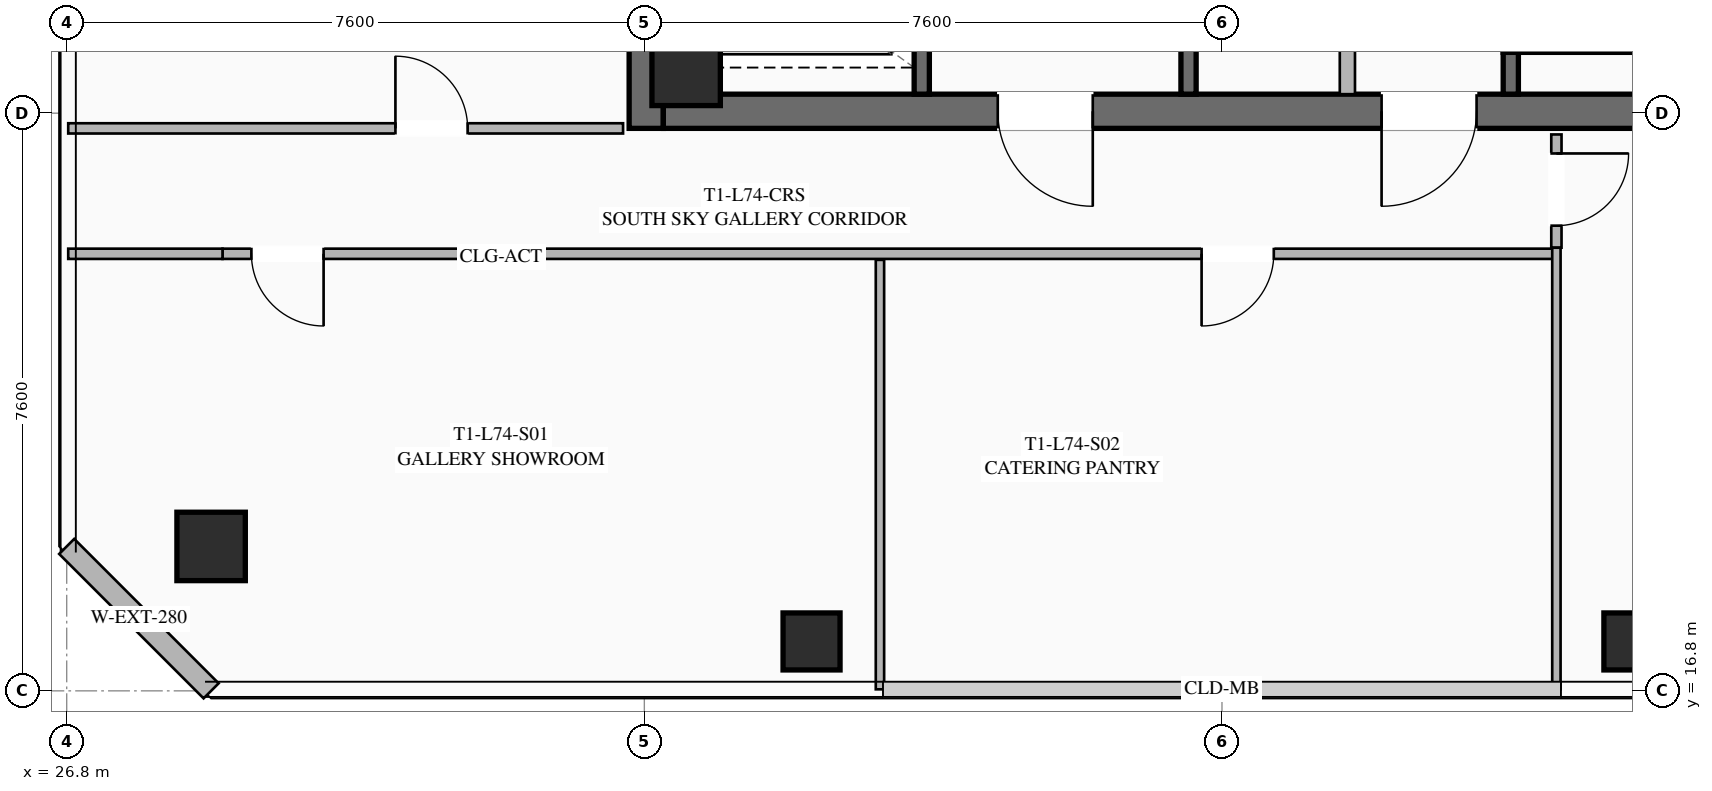
"""IFC4 building model, lengths in metres.
Left out: names, types, materials, properties, quantities, classifications, styles, units other than length and angle.
Written with IfcOpenShell. Run it as: python <this file> out.ifc"""

import sys

from ifc_helpers import new_model, si_unit, direction, frame, frame_2d, origin, origin_2d, place, context, subcontext, project, spatial, rectangle, hollow_rectangle, extrude, element, fill, save


model = new_model("IFC4")
c1 = context("Model", 3, precision=1e-05, world=origin(), true_north=direction((0.0, 1.0)))
c2 = subcontext(c1, "Body", "Model", "MODEL_VIEW")
j1 = project(units=[si_unit("LENGTHUNIT", "METRE"), si_unit("PLANEANGLEUNIT", "RADIAN")], contexts=[c1])
p1 = place(None, origin())
s1 = spatial("IfcSite", under=j1, at=p1, CompositionType="ELEMENT")
p2 = place(p1, origin())
s2 = spatial("IfcBuilding", under=s1, at=p2, CompositionType="ELEMENT")
p3 = place(p2, frame((0.0, 0.0, 274.05)))
s3 = spatial("IfcBuildingStorey", under=s2, at=p3, CompositionType="ELEMENT", Elevation=274.05)
p4 = place(p3, frame((34.425, 24.2, 0.0), z_axis=(0.0, 0.0, 1.0), x_axis=(0.0, 1.0, 0.0)))
e1 = element("IfcWall", 1, at=p4, inside=s3, PredefinedType="SHEAR", context=c2, shape_type="SweptSolid", body=[
    extrude(rectangle(XDim=15.6, YDim=0.45, at=frame_2d((7.8, 0.0))), origin(), (0.0, 0.0, 1.0), 3.55),
])
p5 = place(p3, frame((49.35, 24.425, 0.0), z_axis=(0.0, 0.0, 1.0), x_axis=(-1.0, 0.0, 0.0)))
e2 = element("IfcWall", 2, at=p5, inside=s3, PredefinedType="SHEAR", context=c2, shape_type="SweptSolid", body=[
    extrude(rectangle(XDim=14.7, YDim=0.45, at=frame_2d((7.35, 0.0))), origin(), (0.0, 0.0, 1.0), 3.55),
])
p6 = place(p5, frame((9.05, 0.0, 0.0)))
e3 = element("IfcOpeningElement", 3, at=p6, cuts=e2, PredefinedType="OPENING", context=c2, shape_type="SweptSolid", body=[
    extrude(rectangle(XDim=1.25, YDim=2.25, at=frame_2d((0.625, 1.125))), frame((0.0, 0.235, 0.0), z_axis=(0.0, -1.0, 0.0), x_axis=(1.0, 0.0, 0.0)), (0.0, 0.0, 1.0), 0.47),
])
p7 = place(p5, frame((4.0, 0.0, 0.0)))
e4 = element("IfcOpeningElement", 4, at=p7, cuts=e2, PredefinedType="OPENING", context=c2, shape_type="SweptSolid", body=[
    extrude(rectangle(XDim=1.25, YDim=2.25, at=frame_2d((0.625, 1.125))), frame((0.0, 0.235, 0.0), z_axis=(0.0, -1.0, 0.0), x_axis=(1.0, 0.0, 0.0)), (0.0, 0.0, 1.0), 0.47),
])
for number, where, z_axis, x_axis in (
    (5, (34.95, 24.95, 0.0), (0.0, 0.0, 1.0), (1.0, 0.0, 0.0)),
    (6, (28.7, 18.7, 0.0), (0.0, 0.0, 1.0), (1.0, 0.0, 0.0)),
):
    element("IfcColumn", number, at=place(p3, frame(where, z_axis=z_axis, x_axis=x_axis)), inside=s3, PredefinedType="COLUMN", context=c2, shape_type="SweptSolid", body=[
        extrude(hollow_rectangle(XDim=0.9, YDim=0.9, WallThickness=0.04, at=origin_2d()), origin(), (0.0, 0.0, 1.0), 3.25),
    ])
for number, where, z_axis, x_axis in (
    (7, (36.6, 17.45, 0.0), (0.0, 0.0, 1.0), (1.0, 0.0, 0.0)),
    (8, (47.4, 17.45, 0.0), (0.0, 0.0, 1.0), (1.0, 0.0, 0.0)),
):
    element("IfcColumn", number, at=place(p3, frame(where, z_axis=z_axis, x_axis=x_axis)), inside=s3, PredefinedType="COLUMN", context=c2, shape_type="SweptSolid", body=[
        extrude(hollow_rectangle(XDim=0.75, YDim=0.75, WallThickness=0.032, at=origin_2d()), origin(), (0.0, 0.0, 1.0), 3.25),
    ])
p8 = place(p3, frame((28.7, 16.8, 0.0), z_axis=(0.0, 0.0, 1.0), x_axis=(-0.707106781187, 0.707106781187, 0.0)))
e9 = element("IfcWall", 9, at=p8, inside=s3, PredefinedType="SOLIDWALL", context=c2, shape_type="SweptSolid", body=[
    extrude(rectangle(XDim=2.687, YDim=0.28, at=frame_2d((1.343, 0.0))), origin(), (0.0, 0.0, 1.0), 3.25),
])
p9 = place(p3, frame((45.8, 32.8, 0.0), z_axis=(0.0, 0.0, 1.0), x_axis=(0.0, -1.0, 0.0)))
e10 = element("IfcWall", 10, at=p9, inside=s3, PredefinedType="SHEAR", context=c2, shape_type="SweptSolid", body=[
    extrude(rectangle(XDim=8.15, YDim=0.2, at=frame_2d((4.075, 0.0))), origin(), (0.0, 0.0, 1.0), 3.25),
])
p10 = place(p9, frame((0.45, 0.0, 0.0)))
e11 = element("IfcOpeningElement", 11, at=p10, cuts=e10, PredefinedType="OPENING", context=c2, shape_type="SweptSolid", body=[
    extrude(rectangle(XDim=1.15, YDim=2.2, at=frame_2d((0.575, 1.1))), frame((0.0, 0.11, 0.0), z_axis=(0.0, -1.0, 0.0), x_axis=(1.0, 0.0, 0.0)), (0.0, 0.0, 1.0), 0.22),
])
p11 = place(p3, frame((41.56, 24.65, 0.0), z_axis=(0.0, 0.0, 1.0), x_axis=(0.0, 1.0, 0.0)))
e12 = element("IfcWall", 12, at=p11, inside=s3, PredefinedType="SHEAR", context=c2, shape_type="SweptSolid", body=[
    extrude(rectangle(XDim=14.7, YDim=0.2, at=frame_2d((7.35, 0.0))), origin(), (0.0, 0.0, 1.0), 3.25),
])
p12 = place(p3, frame((38.05, 24.65, 0.0), z_axis=(0.0, 0.0, 1.0), x_axis=(0.0, 1.0, 0.0)))
e13 = element("IfcWall", 13, at=p12, inside=s3, PredefinedType="SHEAR", context=c2, shape_type="SweptSolid", body=[
    extrude(rectangle(XDim=6.55, YDim=0.2, at=frame_2d((3.275, 0.0))), origin(), (0.0, 0.0, 1.0), 3.25),
])
p13 = place(p12, frame((4.975, 0.0, 0.0)))
e14 = element("IfcOpeningElement", 14, at=p13, cuts=e13, PredefinedType="OPENING", context=c2, shape_type="SweptSolid", body=[
    extrude(rectangle(XDim=1.3, YDim=2.25, at=frame_2d((0.65, 1.125))), frame((0.0, 0.11, 0.0), z_axis=(0.0, -1.0, 0.0), x_axis=(1.0, 0.0, 0.0)), (0.0, 0.0, 1.0), 0.22),
])
p14 = place(p12, frame((2.975, 0.0, 0.0)))
e15 = element("IfcOpeningElement", 15, at=p14, cuts=e13, PredefinedType="OPENING", context=c2, shape_type="SweptSolid", body=[
    extrude(rectangle(XDim=1.3, YDim=2.25, at=frame_2d((0.65, 1.125))), frame((0.0, 0.11, 0.0), z_axis=(0.0, -1.0, 0.0), x_axis=(1.0, 0.0, 0.0)), (0.0, 0.0, 1.0), 0.22),
])
p15 = place(p12, frame((0.775, 0.0, 0.0)))
e16 = element("IfcOpeningElement", 16, at=p15, cuts=e13, PredefinedType="OPENING", context=c2, shape_type="SweptSolid", body=[
    extrude(rectangle(XDim=1.3, YDim=2.25, at=frame_2d((0.65, 1.125))), frame((0.0, 0.11, 0.0), z_axis=(0.0, -1.0, 0.0), x_axis=(1.0, 0.0, 0.0)), (0.0, 0.0, 1.0), 0.22),
])
p16 = place(p3, frame((43.65, 24.65, 0.0), z_axis=(0.0, 0.0, 1.0), x_axis=(0.0, 1.0, 0.0)))
e17 = element("IfcWall", 17, at=p16, inside=s3, PredefinedType="SOLIDWALL", context=c2, shape_type="SweptSolid", body=[
    extrude(rectangle(XDim=7.0, YDim=0.2, at=frame_2d((3.5, 0.0))), origin(), (0.0, 0.0, 1.0), 2.603),
])
p17 = place(p16, frame((0.85, 0.0, 0.0)))
e18 = element("IfcOpeningElement", 18, at=p17, cuts=e17, PredefinedType="OPENING", context=c2, shape_type="SweptSolid", body=[
    extrude(rectangle(XDim=0.95, YDim=2.05, at=frame_2d((0.475, 1.025))), frame((0.0, 0.11, 0.0), z_axis=(0.0, -1.0, 0.0), x_axis=(1.0, 0.0, 0.0)), (0.0, 0.0, 1.0), 0.22),
])
p18 = place(p16, frame((4.8, 0.0, 0.0)))
e19 = element("IfcOpeningElement", 19, at=p18, cuts=e17, PredefinedType="OPENING", context=c2, shape_type="SweptSolid", body=[
    extrude(rectangle(XDim=1.05, YDim=2.2, at=frame_2d((0.525, 1.1))), frame((0.0, 0.11, 0.0), z_axis=(0.0, -1.0, 0.0), x_axis=(1.0, 0.0, 0.0)), (0.0, 0.0, 1.0), 0.22),
])
p19 = place(p3, frame((46.4, 22.55, 0.0), z_axis=(0.0, 0.0, 1.0), x_axis=(-1.0, 0.0, 0.0)))
e20 = element("IfcWall", 20, at=p19, inside=s3, PredefinedType="PARTITIONING", context=c2, shape_type="SweptSolid", body=[
    extrude(rectangle(XDim=17.55, YDim=0.135, at=frame_2d((8.775, 0.0))), origin(), (0.0, 0.0, 1.0), 2.603),
])
p20 = place(p19, frame((16.22, 0.0, 0.0)))
e21 = element("IfcOpeningElement", 21, at=p20, cuts=e20, PredefinedType="OPENING", context=c2, shape_type="SweptSolid", body=[
    extrude(rectangle(XDim=0.95, YDim=2.05, at=frame_2d((0.475, 1.025))), frame((0.0, 0.077, 0.0), z_axis=(0.0, -1.0, 0.0), x_axis=(1.0, 0.0, 0.0)), (0.0, 0.0, 1.0), 0.155),
])
p21 = place(p19, frame((3.718, 0.0, 0.0)))
e22 = element("IfcOpeningElement", 22, at=p21, cuts=e20, PredefinedType="OPENING", context=c2, shape_type="SweptSolid", body=[
    extrude(rectangle(XDim=0.95, YDim=2.05, at=frame_2d((0.475, 1.025))), frame((0.0, 0.077, 0.0), z_axis=(0.0, -1.0, 0.0), x_axis=(1.0, 0.0, 0.0)), (0.0, 0.0, 1.0), 0.155),
])
p22 = place(p3, frame((26.82, 22.55, 0.0), z_axis=(0.0, 0.0, 1.0), x_axis=(1.0, 0.0, 0.0)))
e23 = element("IfcWall", 23, at=p22, inside=s3, PredefinedType="PARTITIONING", context=c2, shape_type="SweptSolid", body=[
    extrude(rectangle(XDim=2.03, YDim=0.135, at=frame_2d((1.015, 0.0))), origin(), (0.0, 0.0, 1.0), 2.603),
])
p23 = place(p3, frame((46.4, 24.12, 0.0), z_axis=(0.0, 0.0, 1.0), x_axis=(0.0, -1.0, 0.0)))
e24 = element("IfcWall", 24, at=p23, inside=s3, PredefinedType="PARTITIONING", context=c2, shape_type="SweptSolid", body=[
    extrude(rectangle(XDim=1.49, YDim=0.135, at=frame_2d((0.745, 0.0))), origin(), (0.0, 0.0, 1.0), 2.603),
])
p24 = place(p23, frame((0.25, 0.0, 0.0)))
e25 = element("IfcOpeningElement", 25, at=p24, cuts=e24, PredefinedType="OPENING", context=c2, shape_type="SweptSolid", body=[
    extrude(rectangle(XDim=0.95, YDim=2.05, at=frame_2d((0.475, 1.025))), frame((0.0, 0.077, 0.0), z_axis=(0.0, -1.0, 0.0), x_axis=(1.0, 0.0, 0.0)), (0.0, 0.0, 1.0), 0.155),
])
p25 = place(p3, frame((37.5, 16.82, 0.0), z_axis=(0.0, 0.0, 1.0), x_axis=(0.0, 1.0, 0.0)))
e26 = element("IfcWall", 26, at=p25, inside=s3, PredefinedType="PARTITIONING", context=c2, shape_type="SweptSolid", body=[
    extrude(rectangle(XDim=5.65, YDim=0.11, at=frame_2d((2.825, 0.0))), origin(), (0.0, 0.0, 1.0), 2.603),
])
p26 = place(p3, frame((46.4, 16.82, 0.0), z_axis=(0.0, 0.0, 1.0), x_axis=(0.0, 1.0, 0.0)))
e27 = element("IfcWall", 27, at=p26, inside=s3, PredefinedType="PARTITIONING", context=c2, shape_type="SweptSolid", body=[
    extrude(rectangle(XDim=5.81, YDim=0.11, at=frame_2d((2.905, 0.0))), origin(), (0.0, 0.0, 1.0), 2.603),
])
p27 = place(p3, frame((26.82, 24.2, 0.0), z_axis=(0.0, 0.0, 1.0), x_axis=(1.0, 0.0, 0.0)))
e28 = element("IfcWall", 28, at=p27, inside=s3, PredefinedType="PARTITIONING", context=c2, shape_type="SweptSolid", body=[
    extrude(rectangle(XDim=7.3, YDim=0.135, at=frame_2d((3.65, 0.0))), origin(), (0.0, 0.0, 1.0), 2.603),
])
p28 = place(p27, frame((4.305, 0.0, 0.0)))
e29 = element("IfcOpeningElement", 29, at=p28, cuts=e28, PredefinedType="OPENING", context=c2, shape_type="SweptSolid", body=[
    extrude(rectangle(XDim=0.95, YDim=2.05, at=frame_2d((0.475, 1.025))), frame((0.0, 0.077, 0.0), z_axis=(0.0, -1.0, 0.0), x_axis=(1.0, 0.0, 0.0)), (0.0, 0.0, 1.0), 0.155),
])
p29 = place(p6, origin())
e30 = element("IfcDoor", 30, at=p29, inside=s3, OperationType="SINGLE_SWING_LEFT", PredefinedType="DOOR", context=c2, shape_type="SweptSolid", body=[
    extrude(rectangle(XDim=1.25, YDim=2.25, at=frame_2d((0.625, 1.125))), frame((0.0, 0.025, 0.0), z_axis=(0.0, -1.0, 0.0), x_axis=(1.0, 0.0, 0.0)), (0.0, 0.0, 1.0), 0.05),
])
fill(e3, e30)
p30 = place(p7, origin())
e31 = element("IfcDoor", 31, at=p30, inside=s3, OperationType="SINGLE_SWING_RIGHT", PredefinedType="DOOR", context=c2, shape_type="SweptSolid", body=[
    extrude(rectangle(XDim=1.25, YDim=2.25, at=frame_2d((0.625, 1.125))), frame((0.0, 0.025, 0.0), z_axis=(0.0, -1.0, 0.0), x_axis=(1.0, 0.0, 0.0)), (0.0, 0.0, 1.0), 0.05),
])
fill(e4, e31)
p31 = place(p20, origin())
e32 = element("IfcDoor", 32, at=p31, inside=s3, OperationType="SINGLE_SWING_LEFT", PredefinedType="DOOR", context=c2, shape_type="SweptSolid", body=[
    extrude(rectangle(XDim=0.95, YDim=2.05, at=frame_2d((0.475, 1.025))), frame((0.0, 0.025, 0.0), z_axis=(0.0, -1.0, 0.0), x_axis=(1.0, 0.0, 0.0)), (0.0, 0.0, 1.0), 0.05),
])
fill(e21, e32)
p32 = place(p21, origin())
e33 = element("IfcDoor", 33, at=p32, inside=s3, OperationType="SINGLE_SWING_RIGHT", PredefinedType="DOOR", context=c2, shape_type="SweptSolid", body=[
    extrude(rectangle(XDim=0.95, YDim=2.05, at=frame_2d((0.475, 1.025))), frame((0.0, 0.025, 0.0), z_axis=(0.0, -1.0, 0.0), x_axis=(1.0, 0.0, 0.0)), (0.0, 0.0, 1.0), 0.05),
])
fill(e22, e33)
p33 = place(p24, origin())
e34 = element("IfcDoor", 34, at=p33, inside=s3, OperationType="SINGLE_SWING_LEFT", PredefinedType="DOOR", context=c2, shape_type="SweptSolid", body=[
    extrude(rectangle(XDim=0.95, YDim=2.05, at=frame_2d((0.475, 1.025))), frame((0.0, 0.025, 0.0), z_axis=(0.0, -1.0, 0.0), x_axis=(1.0, 0.0, 0.0)), (0.0, 0.0, 1.0), 0.05),
])
fill(e25, e34)
p34 = place(p28, origin())
e35 = element("IfcDoor", 35, at=p34, inside=s3, OperationType="SINGLE_SWING_LEFT", PredefinedType="DOOR", context=c2, shape_type="SweptSolid", body=[
    extrude(rectangle(XDim=0.95, YDim=2.05, at=frame_2d((0.475, 1.025))), frame((0.0, 0.025, 0.0), z_axis=(0.0, -1.0, 0.0), x_axis=(1.0, 0.0, 0.0)), (0.0, 0.0, 1.0), 0.05),
])
fill(e29, e35)
save(model, sys.argv[1])
